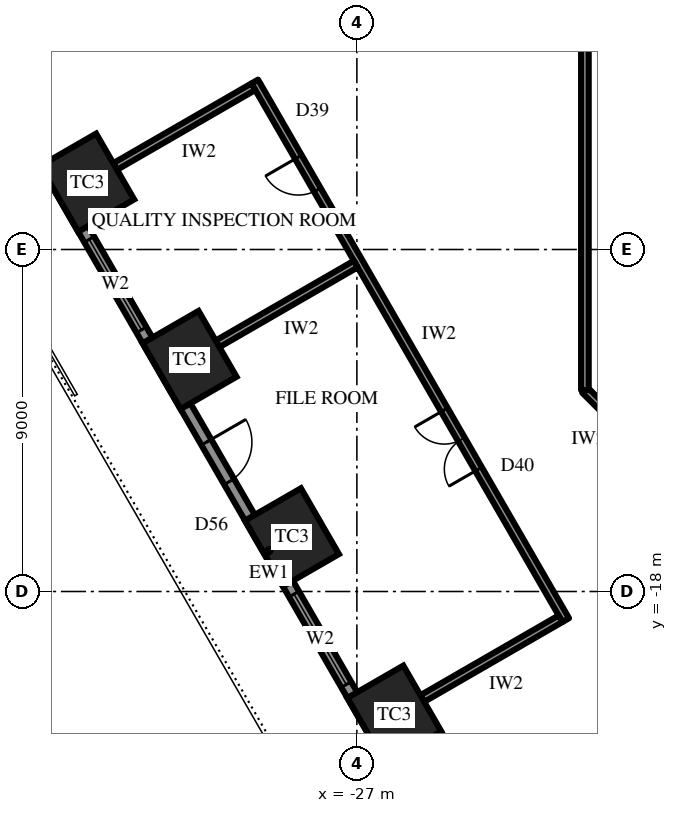
"""IFC4 building model, lengths in metres.
Left out: names, types, materials, properties, quantities, classifications, styles, units other than length and angle.
Written with IfcOpenShell. Run it as: python <this file> out.ifc"""

import sys

from ifc_helpers import new_model, si_unit, direction, frame, frame_2d, origin, origin_2d, place, context, subcontext, project, spatial, rectangle, extrude, element, fill, save


model = new_model("IFC4")
c1 = context("Model", 3, precision=1e-05, world=origin(), true_north=direction((0.0, 1.0)))
c2 = subcontext(c1, "Body", "Model", "MODEL_VIEW")
j1 = project(units=[si_unit("LENGTHUNIT", "METRE"), si_unit("PLANEANGLEUNIT", "RADIAN")], contexts=[c1])
p1 = place(None, origin())
s1 = spatial("IfcSite", under=j1, at=p1, CompositionType="ELEMENT")
p2 = place(p1, origin())
s2 = spatial("IfcBuilding", under=s1, at=p2, CompositionType="ELEMENT")
p3 = place(p2, frame((0.0, 0.0, 73.9)))
s3 = spatial("IfcBuildingStorey", under=s2, at=p3, CompositionType="ELEMENT", Elevation=73.9)
for number, where, z_axis, x_axis in (
    (1, (-34.097, -7.242, 0.0), (0.0, 0.0, 1.0), (0.5, -0.866, 0.0)),
    (2, (-31.403, -11.908, 0.0), (0.0, 0.0, 1.0), (0.5, -0.866, 0.0)),
    (3, (-28.709, -16.575, 0.0), (0.0, 0.0, 1.0), (0.5, -0.866, 0.0)),
    (4, (-26.014, -21.242, 0.0), (0.0, 0.0, 1.0), (0.5, -0.866, 0.0)),
):
    element("IfcColumn", number, at=place(p3, frame(where, z_axis=z_axis, x_axis=x_axis)), inside=s3, PredefinedType="COLUMN", context=c2, shape_type="SweptSolid", body=[
        extrude(rectangle(XDim=2.0, YDim=1.7, at=origin_2d()), origin(), (0.0, 0.0, 1.0), 4.2),
    ])
p4 = place(p3, frame((-37.398, -2.925, 0.0), z_axis=(0.0, 0.0, 1.0), x_axis=(0.499999163675, -0.866025886636, 0.0)))
e5 = element("IfcWall", 5, at=p4, inside=s3, PredefinedType="SOLIDWALL", context=c2, shape_type="SweptSolid", body=[
    extrude(rectangle(XDim=32.332, YDim=0.3, at=frame_2d((16.166, 0.0))), origin(), (0.0, 0.0, 1.0), 2.7),
])
p5 = place(p4, frame((1.319, 0.0, 0.6)))
e6 = element("IfcOpeningElement", 6, at=p5, cuts=e5, PredefinedType="OPENING", context=c2, shape_type="SweptSolid", body=[
    extrude(rectangle(XDim=2.75, YDim=1.85, at=frame_2d((1.375, 0.925))), frame((0.0, 0.16, 0.0), z_axis=(0.0, -1.0, 0.0), x_axis=(1.0, 0.0, 0.0)), (0.0, 0.0, 1.0), 0.32),
])
p6 = place(p4, frame((6.708, 0.0, 0.6)))
e7 = element("IfcOpeningElement", 7, at=p6, cuts=e5, PredefinedType="OPENING", context=c2, shape_type="SweptSolid", body=[
    extrude(rectangle(XDim=2.75, YDim=1.85, at=frame_2d((1.375, 0.925))), frame((0.0, 0.16, 0.0), z_axis=(0.0, -1.0, 0.0), x_axis=(1.0, 0.0, 0.0)), (0.0, 0.0, 1.0), 0.32),
])
p7 = place(p4, frame((12.872, 0.0, 0.0)))
e8 = element("IfcOpeningElement", 8, at=p7, cuts=e5, PredefinedType="OPENING", context=c2, shape_type="SweptSolid", body=[
    extrude(rectangle(XDim=1.2, YDim=2.4, at=frame_2d((0.6, 1.2))), frame((0.0, 0.16, 0.0), z_axis=(0.0, -1.0, 0.0), x_axis=(1.0, 0.0, 0.0)), (0.0, 0.0, 1.0), 0.32),
])
p8 = place(p4, frame((17.485, 0.0, 0.6)))
e9 = element("IfcOpeningElement", 9, at=p8, cuts=e5, PredefinedType="OPENING", context=c2, shape_type="SweptSolid", body=[
    extrude(rectangle(XDim=2.75, YDim=1.85, at=frame_2d((1.375, 0.925))), frame((0.0, 0.16, 0.0), z_axis=(0.0, -1.0, 0.0), x_axis=(1.0, 0.0, 0.0)), (0.0, 0.0, 1.0), 0.32),
])
p9 = place(p4, frame((22.874, 0.0, 0.6)))
e10 = element("IfcOpeningElement", 10, at=p9, cuts=e5, PredefinedType="OPENING", context=c2, shape_type="SweptSolid", body=[
    extrude(rectangle(XDim=2.75, YDim=1.85, at=frame_2d((1.375, 0.925))), frame((0.0, 0.16, 0.0), z_axis=(0.0, -1.0, 0.0), x_axis=(1.0, 0.0, 0.0)), (0.0, 0.0, 1.0), 0.32),
])
p10 = place(p4, frame((28.262, 0.0, 0.6)))
e11 = element("IfcOpeningElement", 11, at=p10, cuts=e5, PredefinedType="OPENING", context=c2, shape_type="SweptSolid", body=[
    extrude(rectangle(XDim=2.75, YDim=1.85, at=frame_2d((1.375, 0.925))), frame((0.0, 0.16, 0.0), z_axis=(0.0, -1.0, 0.0), x_axis=(1.0, 0.0, 0.0)), (0.0, 0.0, 1.0), 0.32),
])
p11 = place(p3, frame((-29.687, -4.58, 0.0), z_axis=(0.0, 0.0, 1.0), x_axis=(0.500000949028, -0.866024855862, 0.0)))
e12 = element("IfcWall", 12, at=p11, inside=s3, PredefinedType="PARTITIONING", context=c2, shape_type="SweptSolid", body=[
    extrude(rectangle(XDim=16.366, YDim=0.2, at=frame_2d((8.183, 0.0))), origin(), (0.0, 0.0, 1.0), 4.0),
])
p12 = place(p11, frame((2.294, 0.0, 0.0)))
e13 = element("IfcOpeningElement", 13, at=p12, cuts=e12, PredefinedType="OPENING", context=c2, shape_type="SweptSolid", body=[
    extrude(rectangle(XDim=1.0, YDim=2.2, at=frame_2d((0.5, 1.1))), frame((0.0, 0.11, 0.0), z_axis=(0.0, -1.0, 0.0), x_axis=(1.0, 0.0, 0.0)), (0.0, 0.0, 1.0), 0.22),
])
p13 = place(p11, frame((9.977, 0.0, 0.0)))
e14 = element("IfcOpeningElement", 14, at=p13, cuts=e12, PredefinedType="OPENING", context=c2, shape_type="SweptSolid", body=[
    extrude(rectangle(XDim=1.8, YDim=2.4, at=frame_2d((0.9, 1.2))), frame((0.0, 0.11, 0.0), z_axis=(0.0, -1.0, 0.0), x_axis=(1.0, 0.0, 0.0)), (0.0, 0.0, 1.0), 0.22),
])
for number, where, z_axis, x_axis in (
    (15, (-29.724, -4.717, 0.0), (0.0, 0.0, 1.0), (-0.866, -0.5, 0.0)),
    (16, (-27.03, -9.383, 0.0), (0.0, 0.0, 1.0), (-0.866, -0.5, 0.0)),
):
    element("IfcWall", number, at=place(p3, frame(where, z_axis=z_axis, x_axis=x_axis)), inside=s3, PredefinedType="PARTITIONING", context=c2, shape_type="SweptSolid", body=[
        extrude(rectangle(XDim=4.2, YDim=0.2, at=frame_2d((2.1, 0.0))), origin(), (0.0, 0.0, 1.0), 2.944),
    ])
p14 = place(p3, frame((-21.641, -18.717, 0.0), z_axis=(0.0, 0.0, 1.0), x_axis=(-0.866009402589, -0.500027713859, 0.0)))
e17 = element("IfcWall", 17, at=p14, inside=s3, PredefinedType="PARTITIONING", context=c2, shape_type="SweptSolid", body=[
    extrude(rectangle(XDim=4.2, YDim=0.2, at=frame_2d((2.1, 0.0))), origin(), (0.0, 0.0, 1.0), 2.992),
])
p15 = place(p3, frame((-19.6, -14.1, 0.0), z_axis=(0.0, 0.0, 1.0), x_axis=(-0.707045124756, 0.707168432242, 0.0)))
e18 = element("IfcWall", 18, at=p15, inside=s3, PredefinedType="PARTITIONING", context=c2, shape_type="SweptSolid", body=[
    extrude(rectangle(XDim=1.98, YDim=0.2, at=frame_2d((0.99, 0.0))), origin(), (0.0, 0.0, 1.0), 4.0),
])
p16 = place(p3, frame((-21.0, -12.7, 0.0), z_axis=(0.0, 0.0, 1.0), x_axis=(0.0, 1.0, 0.0)))
e19 = element("IfcWall", 19, at=p16, inside=s3, PredefinedType="PARTITIONING", context=c2, shape_type="SweptSolid", body=[
    extrude(rectangle(XDim=25.4, YDim=0.2, at=frame_2d((12.7, 0.0))), origin(), (0.0, 0.0, 1.0), 4.0),
])
p17 = place(p16, frame((11.8, 0.0, 0.0)))
e20 = element("IfcOpeningElement", 20, at=p17, cuts=e19, PredefinedType="OPENING", context=c2, shape_type="SweptSolid", body=[
    extrude(rectangle(XDim=1.8, YDim=2.4, at=frame_2d((0.9, 1.2))), frame((0.0, 0.11, 0.0), z_axis=(0.0, -1.0, 0.0), x_axis=(1.0, 0.0, 0.0)), (0.0, 0.0, 1.0), 0.22),
])
p18 = place(p6, origin())
e21 = element("IfcWindow", 21, at=p18, inside=s3, PartitioningType="SINGLE_PANEL", PredefinedType="WINDOW", context=c2, shape_type="SweptSolid", body=[
    extrude(rectangle(XDim=2.75, YDim=1.85, at=frame_2d((1.375, 0.925))), frame((0.0, 0.03, 0.0), z_axis=(0.0, -1.0, 0.0), x_axis=(1.0, 0.0, 0.0)), (0.0, 0.0, 1.0), 0.06),
])
fill(e7, e21)
p19 = place(p7, origin())
e22 = element("IfcDoor", 22, at=p19, inside=s3, OperationType="SINGLE_SWING_RIGHT", PredefinedType="DOOR", context=c2, shape_type="SweptSolid", body=[
    extrude(rectangle(XDim=1.2, YDim=2.4, at=frame_2d((0.6, 1.2))), frame((0.0, 0.025, 0.0), z_axis=(0.0, -1.0, 0.0), x_axis=(1.0, 0.0, 0.0)), (0.0, 0.0, 1.0), 0.05),
])
fill(e8, e22)
p20 = place(p8, origin())
e23 = element("IfcWindow", 23, at=p20, inside=s3, PartitioningType="SINGLE_PANEL", PredefinedType="WINDOW", context=c2, shape_type="SweptSolid", body=[
    extrude(rectangle(XDim=2.75, YDim=1.85, at=frame_2d((1.375, 0.925))), frame((0.0, 0.03, 0.0), z_axis=(0.0, -1.0, 0.0), x_axis=(1.0, 0.0, 0.0)), (0.0, 0.0, 1.0), 0.06),
])
fill(e9, e23)
p21 = place(p12, frame((1.0, 0.0, 0.0), z_axis=(0.0, 0.0, 1.0), x_axis=(-1.0, 0.0, 0.0)))
e24 = element("IfcDoor", 24, at=p21, inside=s3, OperationType="SINGLE_SWING_LEFT", PredefinedType="DOOR", context=c2, shape_type="SweptSolid", body=[
    extrude(rectangle(XDim=1.0, YDim=2.2, at=frame_2d((0.5, 1.1))), frame((0.0, 0.025, 0.0), z_axis=(0.0, -1.0, 0.0), x_axis=(1.0, 0.0, 0.0)), (0.0, 0.0, 1.0), 0.05),
])
fill(e13, e24)
p22 = place(p13, frame((1.8, 0.0, 0.0), z_axis=(0.0, 0.0, 1.0), x_axis=(-1.0, 0.0, 0.0)))
e25 = element("IfcDoor", 25, at=p22, inside=s3, OperationType="DOUBLE_DOOR_SINGLE_SWING", PredefinedType="DOOR", context=c2, shape_type="SweptSolid", body=[
    extrude(rectangle(XDim=1.8, YDim=2.4, at=frame_2d((0.9, 1.2))), frame((0.0, 0.025, 0.0), z_axis=(0.0, -1.0, 0.0), x_axis=(1.0, 0.0, 0.0)), (0.0, 0.0, 1.0), 0.05),
])
fill(e14, e25)
save(model, sys.argv[1])
